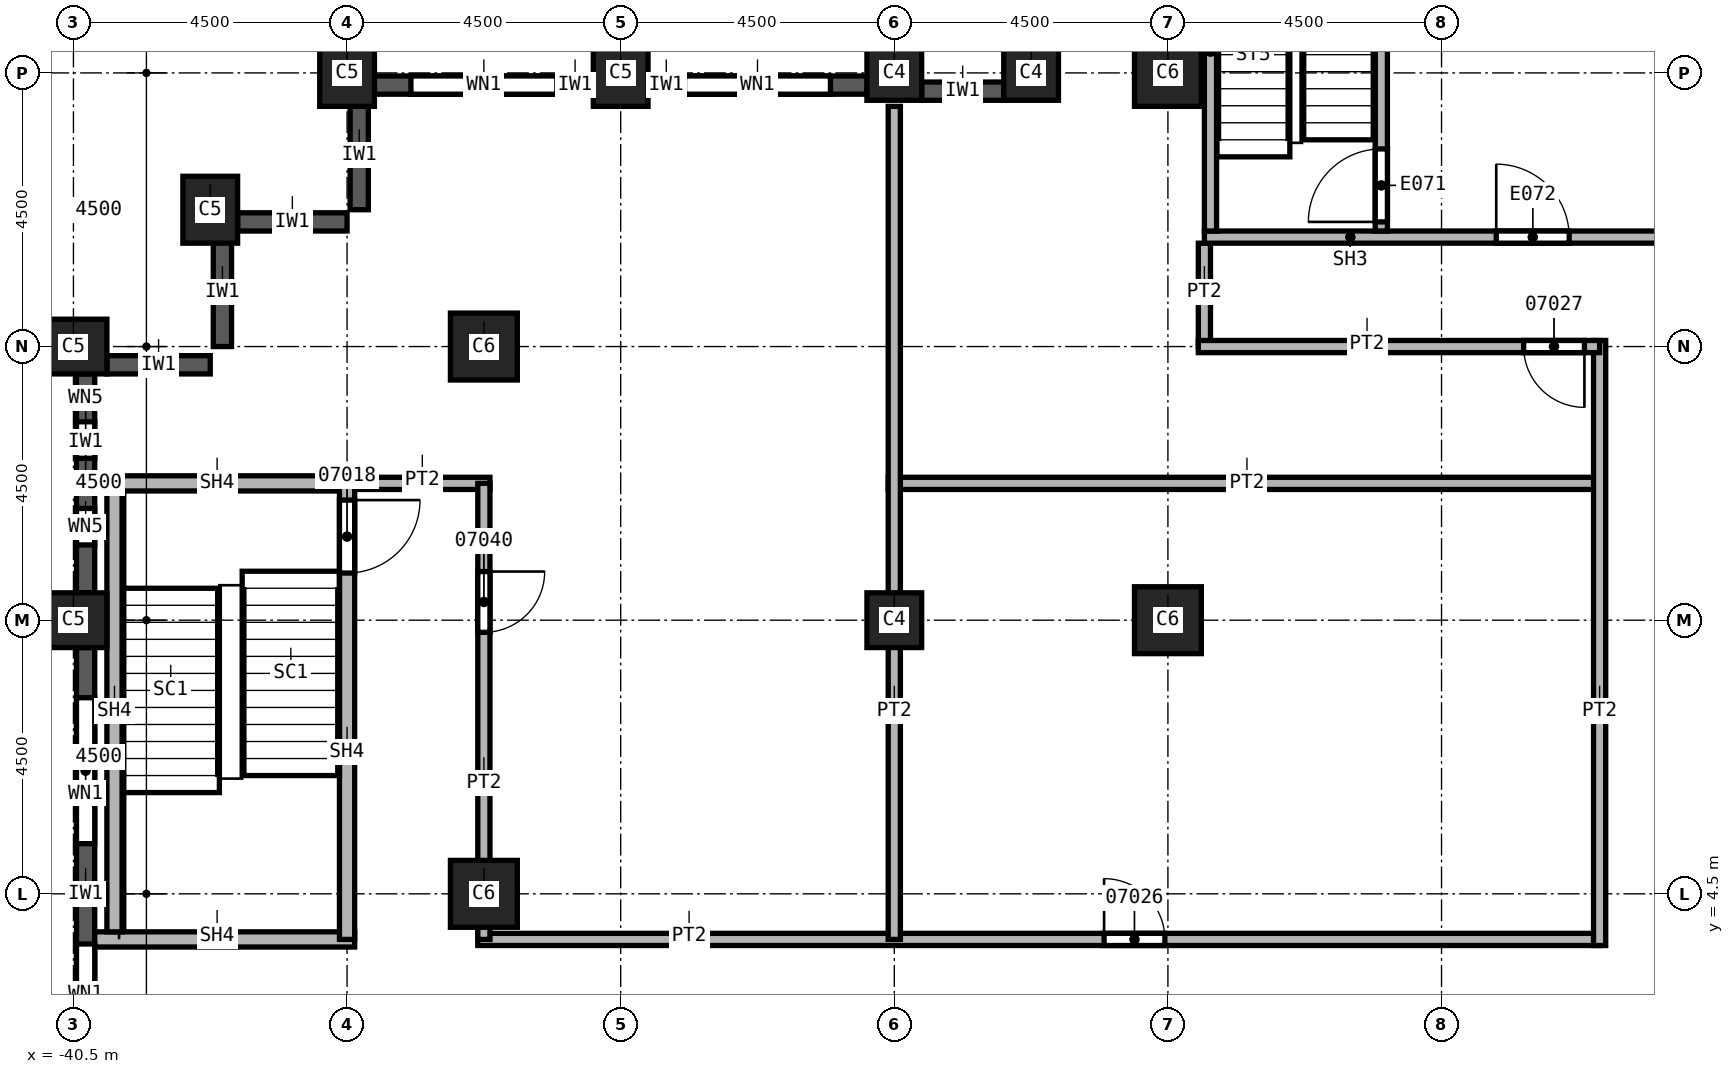
"""IFC4 building model, lengths in metres.
Left out: names, types, materials, properties, quantities, classifications, styles, units other than length and angle.
Written with IfcOpenShell. Run it as: python <this file> out.ifc"""

import sys

from ifc_helpers import new_model, si_unit, direction, frame, frame_2d, origin, origin_2d, place, context, subcontext, project, spatial, rectangle, extrude, element, fill, save


model = new_model("IFC4")
c1 = context("Model", 3, precision=1e-05, world=origin(), true_north=direction((0.0, 1.0)))
c2 = subcontext(c1, "Body", "Model", "MODEL_VIEW")
j1 = project(units=[si_unit("LENGTHUNIT", "METRE"), si_unit("PLANEANGLEUNIT", "RADIAN")], contexts=[c1])
p1 = place(None, origin())
s1 = spatial("IfcSite", under=j1, at=p1, CompositionType="ELEMENT")
p2 = place(p1, origin())
s2 = spatial("IfcBuilding", under=s1, at=p2, CompositionType="ELEMENT")
p3 = place(p2, frame((0.0, 0.0, 138.0)))
s3 = spatial("IfcBuildingStorey", under=s2, at=p3, CompositionType="ELEMENT", Elevation=138.0)
for number, where, z_axis, x_axis in (
    (1, (-40.5, 9.0, 0.0), (0.0, 0.0, 1.0), (0.0, 1.0, 0.0)),
    (2, (-40.5, 13.5, 0.0), (0.0, 0.0, 1.0), (0.0, 1.0, 0.0)),
    (3, (-38.25, 15.75, 0.0), (0.0, 0.0, 1.0), (1.0, 0.0, 0.0)),
    (4, (-31.5, 18.0, 0.0), (0.0, 0.0, 1.0), (1.0, 0.0, 0.0)),
    (5, (-36.0, 18.0, 0.0), (0.0, 0.0, 1.0), (1.0, 0.0, 0.0)),
):
    element("IfcColumn", number, at=place(p3, frame(where, z_axis=z_axis, x_axis=x_axis)), inside=s3, PredefinedType="COLUMN", context=c2, shape_type="SweptSolid", body=[
        extrude(rectangle(XDim=0.9, YDim=1.1, at=origin_2d()), origin(), (0.0, 0.0, 1.0), 3.7),
    ])
for number, where, z_axis, x_axis in (
    (6, (-33.75, 4.5, 0.0), (0.0, 0.0, 1.0), (1.0, 0.0, 0.0)),
    (7, (-33.75, 13.5, 0.0), (0.0, 0.0, 1.0), (1.0, 0.0, 0.0)),
    (8, (-22.5, 9.0, 0.0), (0.0, 0.0, 1.0), (1.0, 0.0, 0.0)),
    (9, (-22.5, 18.0, 0.0), (0.0, 0.0, 1.0), (1.0, 0.0, 0.0)),
):
    element("IfcColumn", number, at=place(p3, frame(where, z_axis=z_axis, x_axis=x_axis)), inside=s3, PredefinedType="COLUMN", context=c2, shape_type="SweptSolid", body=[
        extrude(rectangle(XDim=1.1, YDim=1.1, at=origin_2d()), origin(), (0.0, 0.0, 1.0), 3.7),
    ])
for number, where, z_axis, x_axis in (
    (10, (-27.0, 9.0, 0.0), (0.0, 0.0, 1.0), (1.0, 0.0, 0.0)),
    (11, (-27.0, 18.0, 0.0), (0.0, 0.0, 1.0), (1.0, 0.0, 0.0)),
    (12, (-24.75, 18.0, 0.0), (0.0, 0.0, 1.0), (1.0, 0.0, 0.0)),
):
    element("IfcColumn", number, at=place(p3, frame(where, z_axis=z_axis, x_axis=x_axis)), inside=s3, PredefinedType="COLUMN", context=c2, shape_type="SweptSolid", body=[
        extrude(rectangle(XDim=0.9, YDim=0.9, at=origin_2d()), origin(), (0.0, 0.0, 1.0), 3.7),
    ])
for number, where, z_axis, x_axis in (
    (13, (-35.8, 17.55, 0.0), (0.0, 0.0, 1.0), (0.0, -1.0, 0.0)),
    (14, (-37.8, 15.55, 0.0), (0.0, 0.0, 1.0), (1.0, 0.0, 0.0)),
    (15, (-38.05, 15.3, 0.0), (0.0, 0.0, 1.0), (0.0, -1.0, 0.0)),
):
    element("IfcWall", number, at=place(p3, frame(where, z_axis=z_axis, x_axis=x_axis)), inside=s3, PredefinedType="SOLIDWALL", context=c2, shape_type="SweptSolid", body=[
        extrude(rectangle(XDim=1.8, YDim=0.3, at=frame_2d((0.9, 0.0))), origin(), (0.0, 0.0, 1.0), 3.1),
    ])
p4 = place(p3, frame((-39.95, 13.2, 0.0), z_axis=(0.0, 0.0, 1.0), x_axis=(1.0, 0.0, 0.0)))
e16 = element("IfcWall", 16, at=p4, inside=s3, PredefinedType="SOLIDWALL", context=c2, shape_type="SweptSolid", body=[
    extrude(rectangle(XDim=1.7, YDim=0.3, at=frame_2d((0.85, 0.0))), origin(), (0.0, 0.0, 1.0), 3.1),
])
p5 = place(p3, frame((-25.2, 17.7, 0.0), z_axis=(0.0, 0.0, 1.0), x_axis=(-1.0, 0.0, 0.0)))
e17 = element("IfcWall", 17, at=p5, inside=s3, PredefinedType="SOLIDWALL", context=c2, shape_type="SweptSolid", body=[
    extrude(rectangle(XDim=1.35, YDim=0.3, at=frame_2d((0.675, 0.0))), origin(), (0.0, 0.0, 1.0), 3.1),
])
p6 = place(p3, frame((-27.45, 17.8, 0.0), z_axis=(0.0, 0.0, 1.0), x_axis=(-1.0, 0.0, 0.0)))
e18 = element("IfcWall", 18, at=p6, inside=s3, PredefinedType="SOLIDWALL", context=c2, shape_type="SweptSolid", body=[
    extrude(rectangle(XDim=3.6, YDim=0.3, at=frame_2d((1.8, 0.0))), origin(), (0.0, 0.0, 1.0), 3.1),
])
p7 = place(p6, frame((0.6, 0.0, 0.8)))
e19 = element("IfcOpeningElement", 19, at=p7, cuts=e18, PredefinedType="OPENING", context=c2, shape_type="SweptSolid", body=[
    extrude(rectangle(XDim=2.4, YDim=1.95, at=frame_2d((1.2, 0.975))), frame((0.0, 0.15, 0.0), z_axis=(0.0, -1.0, 0.0), x_axis=(1.0, 0.0, 0.0)), (0.0, 0.0, 1.0), 0.3),
])
p8 = place(p3, frame((-31.95, 17.8, 0.0), z_axis=(0.0, 0.0, 1.0), x_axis=(-1.0, 0.0, 0.0)))
e20 = element("IfcWall", 20, at=p8, inside=s3, PredefinedType="SOLIDWALL", context=c2, shape_type="SweptSolid", body=[
    extrude(rectangle(XDim=3.6, YDim=0.3, at=frame_2d((1.8, 0.0))), origin(), (0.0, 0.0, 1.0), 3.1),
])
p9 = place(p8, frame((0.6, 0.0, 0.8)))
e21 = element("IfcOpeningElement", 21, at=p9, cuts=e20, PredefinedType="OPENING", context=c2, shape_type="SweptSolid", body=[
    extrude(rectangle(XDim=2.4, YDim=1.95, at=frame_2d((1.2, 0.975))), frame((0.0, 0.15, 0.0), z_axis=(0.0, -1.0, 0.0), x_axis=(1.0, 0.0, 0.0)), (0.0, 0.0, 1.0), 0.3),
])
p10 = place(p3, frame((-40.3, 13.05, 0.0), z_axis=(0.0, 0.0, 1.0), x_axis=(0.0, -1.0, 0.0)))
e22 = element("IfcWall", 22, at=p10, inside=s3, PredefinedType="SOLIDWALL", context=c2, shape_type="SweptSolid", body=[
    extrude(rectangle(XDim=3.6, YDim=0.3, at=frame_2d((1.8, 0.0))), origin(), (0.0, 0.0, 1.0), 3.1),
])
p11 = place(p10, frame((0.788, 0.0, 0.8)))
e23 = element("IfcOpeningElement", 23, at=p11, cuts=e22, PredefinedType="OPENING", context=c2, shape_type="SweptSolid", body=[
    extrude(rectangle(XDim=0.6, YDim=1.95, at=frame_2d((0.3, 0.975))), frame((0.0, 0.15, 0.0), z_axis=(0.0, -1.0, 0.0), x_axis=(1.0, 0.0, 0.0)), (0.0, 0.0, 1.0), 0.3),
])
p12 = place(p10, frame((2.212, 0.0, 0.8)))
e24 = element("IfcOpeningElement", 24, at=p12, cuts=e22, PredefinedType="OPENING", context=c2, shape_type="SweptSolid", body=[
    extrude(rectangle(XDim=0.6, YDim=1.95, at=frame_2d((0.3, 0.975))), frame((0.0, 0.15, 0.0), z_axis=(0.0, -1.0, 0.0), x_axis=(1.0, 0.0, 0.0)), (0.0, 0.0, 1.0), 0.3),
])
p13 = place(p3, frame((-40.3, 8.55, 0.0), z_axis=(0.0, 0.0, 1.0), x_axis=(0.0, -1.0, 0.0)))
e25 = element("IfcWall", 25, at=p13, inside=s3, PredefinedType="SOLIDWALL", context=c2, shape_type="SweptSolid", body=[
    extrude(rectangle(XDim=8.1, YDim=0.3, at=frame_2d((4.05, 0.0))), origin(), (0.0, 0.0, 1.0), 3.1),
])
p14 = place(p13, frame((0.825, 0.0, 0.8)))
e26 = element("IfcOpeningElement", 26, at=p14, cuts=e25, PredefinedType="OPENING", context=c2, shape_type="SweptSolid", body=[
    extrude(rectangle(XDim=2.4, YDim=1.95, at=frame_2d((1.2, 0.975))), frame((0.0, 0.15, 0.0), z_axis=(0.0, -1.0, 0.0), x_axis=(1.0, 0.0, 0.0)), (0.0, 0.0, 1.0), 0.3),
])
p15 = place(p13, frame((4.875, 0.0, 0.8)))
e27 = element("IfcOpeningElement", 27, at=p15, cuts=e25, PredefinedType="OPENING", context=c2, shape_type="SweptSolid", body=[
    extrude(rectangle(XDim=2.4, YDim=1.95, at=frame_2d((1.2, 0.975))), frame((0.0, 0.15, 0.0), z_axis=(0.0, -1.0, 0.0), x_axis=(1.0, 0.0, 0.0)), (0.0, 0.0, 1.0), 0.3),
])
p16 = place(p3, frame((-36.0, 11.25, 0.0), z_axis=(0.0, 0.0, 1.0), x_axis=(1.0, 0.0, 0.0)))
e28 = element("IfcWall", 28, at=p16, inside=s3, PredefinedType="PARTITIONING", context=c2, shape_type="SweptSolid", body=[
    extrude(rectangle(XDim=2.35, YDim=0.2, at=frame_2d((1.175, 0.0))), origin(), (0.0, 0.0, 1.0), 3.7),
])
p17 = place(p3, frame((-33.85, 3.75, 0.0), z_axis=(0.0, 0.0, 1.0), x_axis=(1.0, 0.0, 0.0)))
e29 = element("IfcWall", 29, at=p17, inside=s3, PredefinedType="PARTITIONING", context=c2, shape_type="SweptSolid", body=[
    extrude(rectangle(XDim=18.45, YDim=0.2, at=frame_2d((9.225, 0.0))), origin(), (0.0, 0.0, 1.0), 3.7),
])
p18 = place(p17, frame((10.3, 0.0, 0.0)))
e30 = element("IfcOpeningElement", 30, at=p18, cuts=e29, PredefinedType="OPENING", context=c2, shape_type="SweptSolid", body=[
    extrude(rectangle(XDim=1.0, YDim=2.1, at=frame_2d((0.5, 1.05))), frame((0.0, 0.1, 0.0), z_axis=(0.0, -1.0, 0.0), x_axis=(1.0, 0.0, 0.0)), (0.0, 0.0, 1.0), 0.2),
])
p19 = place(p3, frame((-33.75, 11.25, 0.0), z_axis=(0.0, 0.0, 1.0), x_axis=(0.0, -1.0, 0.0)))
e31 = element("IfcWall", 31, at=p19, inside=s3, PredefinedType="PARTITIONING", context=c2, shape_type="SweptSolid", body=[
    extrude(rectangle(XDim=7.5, YDim=0.2, at=frame_2d((3.75, 0.0))), origin(), (0.0, 0.0, 1.0), 3.7),
])
p20 = place(p19, frame((1.45, 0.0, 0.0)))
e32 = element("IfcOpeningElement", 32, at=p20, cuts=e31, PredefinedType="OPENING", context=c2, shape_type="SweptSolid", body=[
    extrude(rectangle(XDim=1.0, YDim=2.1, at=frame_2d((0.5, 1.05))), frame((0.0, 0.1, 0.0), z_axis=(0.0, -1.0, 0.0), x_axis=(1.0, 0.0, 0.0)), (0.0, 0.0, 1.0), 0.2),
])
p21 = place(p3, frame((-27.1, 11.25, 0.0), z_axis=(0.0, 0.0, 1.0), x_axis=(1.0, 0.0, 0.0)))
e33 = element("IfcWall", 33, at=p21, inside=s3, PredefinedType="PARTITIONING", context=c2, shape_type="SweptSolid", body=[
    extrude(rectangle(XDim=11.7, YDim=0.2, at=frame_2d((5.85, 0.0))), origin(), (0.0, 0.0, 1.0), 3.7),
])
p22 = place(p3, frame((-27.0, 3.75, 0.0), z_axis=(0.0, 0.0, 1.0), x_axis=(0.0, 1.0, 0.0)))
e34 = element("IfcWall", 34, at=p22, inside=s3, PredefinedType="PARTITIONING", context=c2, shape_type="SweptSolid", body=[
    extrude(rectangle(XDim=13.7, YDim=0.2, at=frame_2d((6.85, 0.0))), origin(), (0.0, 0.0, 1.0), 3.7),
])
p23 = place(p3, frame((-21.9, 13.5, 0.0), z_axis=(0.0, 0.0, 1.0), x_axis=(0.0, 1.0, 0.0)))
e35 = element("IfcWall", 35, at=p23, inside=s3, PredefinedType="PARTITIONING", context=c2, shape_type="SweptSolid", body=[
    extrude(rectangle(XDim=1.7, YDim=0.2, at=frame_2d((0.85, 0.0))), origin(), (0.0, 0.0, 1.0), 3.7),
])
p24 = place(p3, frame((-15.4, 3.65, 0.0), z_axis=(0.0, 0.0, 1.0), x_axis=(0.0, 1.0, 0.0)))
e36 = element("IfcWall", 36, at=p24, inside=s3, PredefinedType="PARTITIONING", context=c2, shape_type="SweptSolid", body=[
    extrude(rectangle(XDim=9.95, YDim=0.2, at=frame_2d((4.975, 0.0))), origin(), (0.0, 0.0, 1.0), 3.7),
])
p25 = place(p3, frame((-15.4, 13.5, 0.0), z_axis=(0.0, 0.0, 1.0), x_axis=(-1.0, 0.0, 0.0)))
e37 = element("IfcWall", 37, at=p25, inside=s3, PredefinedType="PARTITIONING", context=c2, shape_type="SweptSolid", body=[
    extrude(rectangle(XDim=6.6, YDim=0.2, at=frame_2d((3.3, 0.0))), origin(), (0.0, 0.0, 1.0), 3.7),
])
p26 = place(p25, frame((0.25, 0.0, 0.0)))
e38 = element("IfcOpeningElement", 38, at=p26, cuts=e37, PredefinedType="OPENING", context=c2, shape_type="SweptSolid", body=[
    extrude(rectangle(XDim=1.0, YDim=2.1, at=frame_2d((0.5, 1.05))), frame((0.0, 0.1, 0.0), z_axis=(0.0, -1.0, 0.0), x_axis=(1.0, 0.0, 0.0)), (0.0, 0.0, 1.0), 0.2),
])
p27 = place(p3, frame((-40.15, 3.75, 0.0), z_axis=(0.0, 0.0, 1.0), x_axis=(1.0, 0.0, 0.0)))
e39 = element("IfcWall", 39, at=p27, inside=s3, PredefinedType="SOLIDWALL", context=c2, shape_type="SweptSolid", body=[
    extrude(rectangle(XDim=4.275, YDim=0.25, at=frame_2d((2.137, 0.0))), origin(), (0.0, 0.0, 1.0), 3.7),
])
p28 = place(p3, frame((-40.15, 11.25, 0.0), z_axis=(0.0, 0.0, 1.0), x_axis=(1.0, 0.0, 0.0)))
e40 = element("IfcWall", 40, at=p28, inside=s3, PredefinedType="SOLIDWALL", context=c2, shape_type="SweptSolid", body=[
    extrude(rectangle(XDim=4.15, YDim=0.25, at=frame_2d((2.075, 0.0))), origin(), (0.0, 0.0, 1.0), 3.7),
])
p29 = place(p3, frame((-36.0, 11.375, 0.0), z_axis=(0.0, 0.0, 1.0), x_axis=(0.0, -1.0, 0.0)))
e41 = element("IfcWall", 41, at=p29, inside=s3, PredefinedType="SOLIDWALL", context=c2, shape_type="SweptSolid", body=[
    extrude(rectangle(XDim=7.625, YDim=0.25, at=frame_2d((3.812, 0.0))), origin(), (0.0, 0.0, 1.0), 3.7),
])
p30 = place(p29, frame((0.4, 0.0, 0.0)))
e42 = element("IfcOpeningElement", 42, at=p30, cuts=e41, PredefinedType="OPENING", context=c2, shape_type="SweptSolid", body=[
    extrude(rectangle(XDim=1.2, YDim=2.1, at=frame_2d((0.6, 1.05))), frame((0.0, 0.125, 0.0), z_axis=(0.0, -1.0, 0.0), x_axis=(1.0, 0.0, 0.0)), (0.0, 0.0, 1.0), 0.25),
])
p31 = place(p3, frame((-21.9, 15.3, 0.0), z_axis=(0.0, 0.0, 1.0), x_axis=(1.0, 0.0, 0.0)))
e43 = element("IfcWall", 43, at=p31, inside=s3, PredefinedType="SOLIDWALL", context=c2, shape_type="SweptSolid", body=[
    extrude(rectangle(XDim=8.275, YDim=0.2, at=frame_2d((4.137, 0.0))), origin(), (0.0, 0.0, 1.0), 3.7),
])
p32 = place(p31, frame((4.8, 0.0, 0.0)))
e44 = element("IfcOpeningElement", 44, at=p32, cuts=e43, PredefinedType="OPENING", context=c2, shape_type="SweptSolid", body=[
    extrude(rectangle(XDim=1.2, YDim=2.1, at=frame_2d((0.6, 1.05))), frame((0.0, 0.1, 0.0), z_axis=(0.0, -1.0, 0.0), x_axis=(1.0, 0.0, 0.0)), (0.0, 0.0, 1.0), 0.2),
])
p33 = place(p3, frame((-21.8, 15.4, 0.0), z_axis=(0.0, 0.0, 1.0), x_axis=(0.0, 1.0, 0.0)))
e45 = element("IfcWall", 45, at=p33, inside=s3, PredefinedType="SOLIDWALL", context=c2, shape_type="SweptSolid", body=[
    extrude(rectangle(XDim=5.9, YDim=0.2, at=frame_2d((2.95, 0.0))), origin(), (0.0, 0.0, 1.0), 3.7),
])
p34 = place(p3, frame((-18.99, 15.4, 0.0), z_axis=(0.0, 0.0, 1.0), x_axis=(0.0, 1.0, 0.0)))
e46 = element("IfcWall", 46, at=p34, inside=s3, PredefinedType="SOLIDWALL", context=c2, shape_type="SweptSolid", body=[
    extrude(rectangle(XDim=5.9, YDim=0.2, at=frame_2d((2.95, 0.0))), origin(), (0.0, 0.0, 1.0), 3.7),
])
p35 = place(p34, frame((0.15, 0.0, 0.0)))
e47 = element("IfcOpeningElement", 47, at=p35, cuts=e46, PredefinedType="OPENING", context=c2, shape_type="SweptSolid", body=[
    extrude(rectangle(XDim=1.2, YDim=2.1, at=frame_2d((0.6, 1.05))), frame((0.0, 0.1, 0.0), z_axis=(0.0, -1.0, 0.0), x_axis=(1.0, 0.0, 0.0)), (0.0, 0.0, 1.0), 0.2),
])
p36 = place(p3, frame((-39.825, 3.875, 0.0), z_axis=(0.0, 0.0, 1.0), x_axis=(0.0, 1.0, 0.0)))
e48 = element("IfcWall", 48, at=p36, inside=s3, PredefinedType="SOLIDWALL", context=c2, shape_type="SweptSolid", body=[
    extrude(rectangle(XDim=7.25, YDim=0.25, at=frame_2d((3.625, 0.0))), origin(), (0.0, 0.0, 1.0), 3.7),
])
p37 = place(p7, origin())
e49 = element("IfcWindow", 49, at=p37, inside=s3, PartitioningType="SINGLE_PANEL", PredefinedType="WINDOW", context=c2, shape_type="SweptSolid", body=[
    extrude(rectangle(XDim=2.4, YDim=1.95, at=frame_2d((1.2, 0.975))), frame((0.0, 0.03, 0.0), z_axis=(0.0, -1.0, 0.0), x_axis=(1.0, 0.0, 0.0)), (0.0, 0.0, 1.0), 0.06),
])
fill(e19, e49)
p38 = place(p9, origin())
e50 = element("IfcWindow", 50, at=p38, inside=s3, PartitioningType="SINGLE_PANEL", PredefinedType="WINDOW", context=c2, shape_type="SweptSolid", body=[
    extrude(rectangle(XDim=2.4, YDim=1.95, at=frame_2d((1.2, 0.975))), frame((0.0, 0.03, 0.0), z_axis=(0.0, -1.0, 0.0), x_axis=(1.0, 0.0, 0.0)), (0.0, 0.0, 1.0), 0.06),
])
fill(e21, e50)
p39 = place(p14, origin())
e51 = element("IfcWindow", 51, at=p39, inside=s3, PartitioningType="SINGLE_PANEL", PredefinedType="WINDOW", context=c2, shape_type="SweptSolid", body=[
    extrude(rectangle(XDim=2.4, YDim=1.95, at=frame_2d((1.2, 0.975))), frame((0.0, 0.03, 0.0), z_axis=(0.0, -1.0, 0.0), x_axis=(1.0, 0.0, 0.0)), (0.0, 0.0, 1.0), 0.06),
])
fill(e26, e51)
p40 = place(p15, origin())
e52 = element("IfcWindow", 52, at=p40, inside=s3, PartitioningType="SINGLE_PANEL", PredefinedType="WINDOW", context=c2, shape_type="SweptSolid", body=[
    extrude(rectangle(XDim=2.4, YDim=1.95, at=frame_2d((1.2, 0.975))), frame((0.0, 0.03, 0.0), z_axis=(0.0, -1.0, 0.0), x_axis=(1.0, 0.0, 0.0)), (0.0, 0.0, 1.0), 0.06),
])
fill(e27, e52)
p41 = place(p30, origin())
e53 = element("IfcDoor", 53, at=p41, inside=s3, OperationType="SINGLE_SWING_LEFT", PredefinedType="DOOR", context=c2, shape_type="SweptSolid", body=[
    extrude(rectangle(XDim=1.2, YDim=2.1, at=frame_2d((0.6, 1.05))), frame((0.0, 0.025, 0.0), z_axis=(0.0, -1.0, 0.0), x_axis=(1.0, 0.0, 0.0)), (0.0, 0.0, 1.0), 0.05),
])
fill(e42, e53)
p42 = place(p18, origin())
e54 = element("IfcDoor", 54, at=p42, inside=s3, OperationType="SINGLE_SWING_LEFT", PredefinedType="DOOR", context=c2, shape_type="SweptSolid", body=[
    extrude(rectangle(XDim=1.0, YDim=2.1, at=frame_2d((0.5, 1.05))), frame((0.0, 0.025, 0.0), z_axis=(0.0, -1.0, 0.0), x_axis=(1.0, 0.0, 0.0)), (0.0, 0.0, 1.0), 0.05),
])
fill(e30, e54)
p43 = place(p26, origin())
e55 = element("IfcDoor", 55, at=p43, inside=s3, OperationType="SINGLE_SWING_RIGHT", PredefinedType="DOOR", context=c2, shape_type="SweptSolid", body=[
    extrude(rectangle(XDim=1.0, YDim=2.1, at=frame_2d((0.5, 1.05))), frame((0.0, 0.025, 0.0), z_axis=(0.0, -1.0, 0.0), x_axis=(1.0, 0.0, 0.0)), (0.0, 0.0, 1.0), 0.05),
])
fill(e38, e55)
p44 = place(p20, origin())
e56 = element("IfcDoor", 56, at=p44, inside=s3, OperationType="SINGLE_SWING_LEFT", PredefinedType="DOOR", context=c2, shape_type="SweptSolid", body=[
    extrude(rectangle(XDim=1.0, YDim=2.1, at=frame_2d((0.5, 1.05))), frame((0.0, 0.025, 0.0), z_axis=(0.0, -1.0, 0.0), x_axis=(1.0, 0.0, 0.0)), (0.0, 0.0, 1.0), 0.05),
])
fill(e32, e56)
p45 = place(p35, origin())
e57 = element("IfcDoor", 57, at=p45, inside=s3, OperationType="SINGLE_SWING_LEFT", PredefinedType="DOOR", context=c2, shape_type="SweptSolid", body=[
    extrude(rectangle(XDim=1.2, YDim=2.1, at=frame_2d((0.6, 1.05))), frame((0.0, 0.025, 0.0), z_axis=(0.0, -1.0, 0.0), x_axis=(1.0, 0.0, 0.0)), (0.0, 0.0, 1.0), 0.05),
])
fill(e47, e57)
p46 = place(p32, origin())
e58 = element("IfcDoor", 58, at=p46, inside=s3, OperationType="SINGLE_SWING_RIGHT", PredefinedType="DOOR", context=c2, shape_type="SweptSolid", body=[
    extrude(rectangle(XDim=1.2, YDim=2.1, at=frame_2d((0.6, 1.05))), frame((0.0, 0.025, 0.0), z_axis=(0.0, -1.0, 0.0), x_axis=(1.0, 0.0, 0.0)), (0.0, 0.0, 1.0), 0.05),
])
fill(e44, e58)
p47 = place(p11, origin())
e59 = element("IfcWindow", 59, at=p47, inside=s3, PartitioningType="SINGLE_PANEL", PredefinedType="WINDOW", context=c2, shape_type="SweptSolid", body=[
    extrude(rectangle(XDim=0.6, YDim=1.95, at=frame_2d((0.3, 0.975))), frame((0.0, 0.03, 0.0), z_axis=(0.0, -1.0, 0.0), x_axis=(1.0, 0.0, 0.0)), (0.0, 0.0, 1.0), 0.06),
])
fill(e23, e59)
p48 = place(p12, origin())
e60 = element("IfcWindow", 60, at=p48, inside=s3, PartitioningType="SINGLE_PANEL", PredefinedType="WINDOW", context=c2, shape_type="SweptSolid", body=[
    extrude(rectangle(XDim=0.6, YDim=1.95, at=frame_2d((0.3, 0.975))), frame((0.0, 0.03, 0.0), z_axis=(0.0, -1.0, 0.0), x_axis=(1.0, 0.0, 0.0)), (0.0, 0.0, 1.0), 0.06),
])
fill(e24, e60)
save(model, sys.argv[1])
